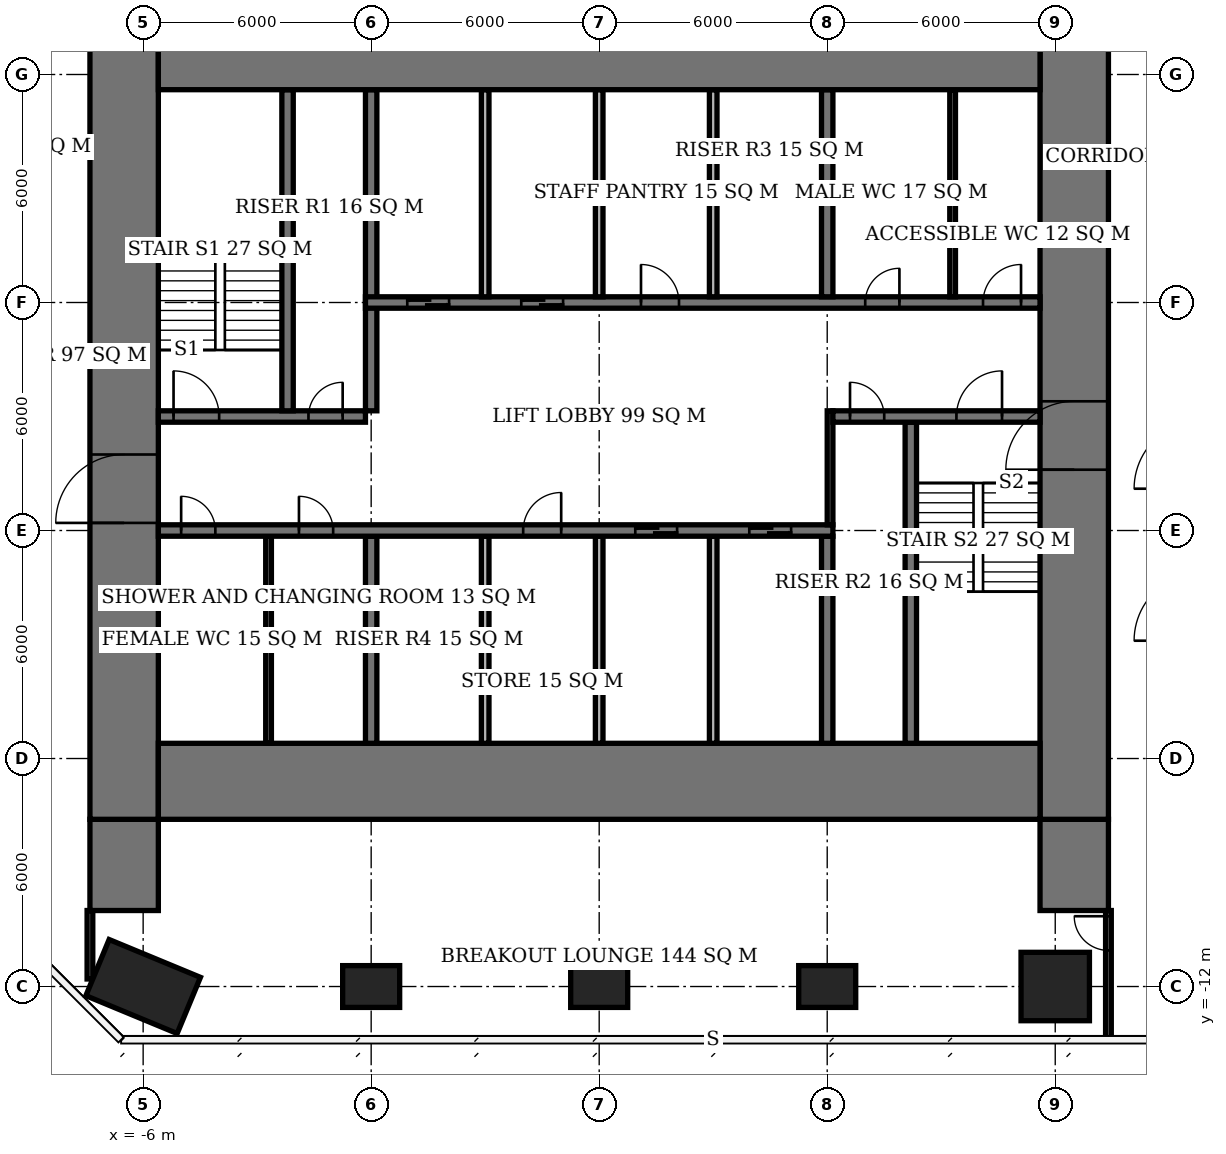
"""IFC4 building model, lengths in metres.
Left out: names, types, materials, properties, quantities, classifications, styles, units other than length and angle.
Written with IfcOpenShell. Run it as: python <this file> out.ifc"""

import sys

from ifc_helpers import new_model, si_unit, direction, frame, frame_2d, origin, origin_2d, place, context, subcontext, project, spatial, rectangle, extrude, element, fill, save


model = new_model("IFC4")
c1 = context("Model", 3, precision=1e-05, world=origin(), true_north=direction((0.0, 1.0)))
c2 = subcontext(c1, "Body", "Model", "MODEL_VIEW")
j1 = project(units=[si_unit("LENGTHUNIT", "METRE"), si_unit("PLANEANGLEUNIT", "RADIAN")], contexts=[c1])
p1 = place(None, origin())
s1 = spatial("IfcSite", under=j1, at=p1, CompositionType="ELEMENT")
p2 = place(p1, origin())
s2 = spatial("IfcBuilding", under=s1, at=p2, CompositionType="ELEMENT")
p3 = place(p2, frame((0.0, 0.0, 169.4)))
s3 = spatial("IfcBuildingStorey", under=s2, at=p3, CompositionType="ELEMENT", Elevation=169.4)
p4 = place(p3, frame((-6.0, -12.0, 0.0), z_axis=(0.0, 0.0, 1.0), x_axis=(-0.923879532511, 0.382683432365, 0.0)))
e1 = element("IfcColumn", 1, at=p4, inside=s3, PredefinedType="COLUMN", context=c2, shape_type="SweptSolid", body=[
    extrude(rectangle(XDim=2.6, YDim=1.6, at=origin_2d()), origin(), (0.0, 0.0, 1.0), 3.9),
])
for number, where, z_axis, x_axis in (
    (2, (0.0, -12.0, 0.0), (0.0, 0.0, 1.0), (1.0, 0.0, 0.0)),
    (3, (6.0, -12.0, 0.0), (0.0, 0.0, 1.0), (1.0, 0.0, 0.0)),
    (4, (12.0, -12.0, 0.0), (0.0, 0.0, 1.0), (1.0, 0.0, 0.0)),
):
    element("IfcColumn", number, at=place(p3, frame(where, z_axis=z_axis, x_axis=x_axis)), inside=s3, PredefinedType="COLUMN", context=c2, shape_type="SweptSolid", body=[
        extrude(rectangle(XDim=1.5, YDim=1.1, at=origin_2d()), origin(), (0.0, 0.0, 1.0), 3.9),
    ])
p5 = place(p3, frame((18.0, -12.0, 0.0), z_axis=(0.0, 0.0, 1.0), x_axis=(1.0, 0.0, 0.0)))
e5 = element("IfcColumn", 5, at=p5, inside=s3, PredefinedType="COLUMN", context=c2, shape_type="SweptSolid", body=[
    extrude(rectangle(XDim=1.8, YDim=1.8, at=origin_2d()), origin(), (0.0, 0.0, 1.0), 3.9),
])
for number, where, z_axis, x_axis in (
    (6, (-5.6, -6.6, 0.0), (0.0, 0.0, 1.0), (1.0, 0.0, 0.0)),
    (7, (-5.6, 12.6, 0.0), (0.0, 0.0, 1.0), (1.0, 0.0, 0.0)),
):
    element("IfcWall", number, at=place(p3, frame(where, z_axis=z_axis, x_axis=x_axis)), inside=s3, PredefinedType="SHEAR", context=c2, shape_type="SweptSolid", body=[
        extrude(rectangle(XDim=23.2, YDim=2.0, at=frame_2d((11.6, 0.0))), origin(), (0.0, 0.0, 1.0), 3.9),
    ])
p6 = place(p3, frame((-6.5, -7.6, 0.0), z_axis=(0.0, 0.0, 1.0), x_axis=(0.0, 1.0, 0.0)))
e8 = element("IfcWall", 8, at=p6, inside=s3, PredefinedType="SHEAR", context=c2, shape_type="SweptSolid", body=[
    extrude(rectangle(XDim=21.2, YDim=1.8, at=frame_2d((10.6, 0.0))), origin(), (0.0, 0.0, 1.0), 3.9),
])
p7 = place(p6, frame((7.8, 0.0, 0.0)))
e9 = element("IfcOpeningElement", 9, at=p7, cuts=e8, PredefinedType="OPENING", context=c2, shape_type="SweptSolid", body=[
    extrude(rectangle(XDim=1.8, YDim=2.4, at=frame_2d((0.9, 1.2))), frame((0.0, 0.91, 0.0), z_axis=(0.0, -1.0, 0.0), x_axis=(1.0, 0.0, 0.0)), (0.0, 0.0, 1.0), 1.82),
])
p8 = place(p3, frame((18.5, -7.6, 0.0), z_axis=(0.0, 0.0, 1.0), x_axis=(0.0, 1.0, 0.0)))
e10 = element("IfcWall", 10, at=p8, inside=s3, PredefinedType="SHEAR", context=c2, shape_type="SweptSolid", body=[
    extrude(rectangle(XDim=21.2, YDim=1.8, at=frame_2d((10.6, 0.0))), origin(), (0.0, 0.0, 1.0), 3.9),
])
p9 = place(p8, frame((9.2, 0.0, 0.0)))
e11 = element("IfcOpeningElement", 11, at=p9, cuts=e10, PredefinedType="OPENING", context=c2, shape_type="SweptSolid", body=[
    extrude(rectangle(XDim=1.8, YDim=2.4, at=frame_2d((0.9, 1.2))), frame((0.0, 0.91, 0.0), z_axis=(0.0, -1.0, 0.0), x_axis=(1.0, 0.0, 0.0)), (0.0, 0.0, 1.0), 1.82),
])
for number, where, z_axis, x_axis in (
    (12, (-6.5, -10.0, 0.0), (0.0, 0.0, 1.0), (0.0, 1.0, 0.0)),
    (13, (18.5, -10.0, 0.0), (0.0, 0.0, 1.0), (0.0, 1.0, 0.0)),
):
    element("IfcWall", number, at=place(p3, frame(where, z_axis=z_axis, x_axis=x_axis)), inside=s3, PredefinedType="SHEAR", context=c2, shape_type="SweptSolid", body=[
        extrude(rectangle(XDim=2.4, YDim=1.8, at=frame_2d((1.2, 0.0))), origin(), (0.0, 0.0, 1.0), 3.9),
    ])
p10 = place(p3, frame((-5.6, 0.0, 0.0), z_axis=(0.0, 0.0, 1.0), x_axis=(1.0, 0.0, 0.0)))
e14 = element("IfcWall", 14, at=p10, inside=s3, PredefinedType="SHEAR", context=c2, shape_type="SweptSolid", body=[
    extrude(rectangle(XDim=17.75, YDim=0.3, at=frame_2d((8.875, 0.0))), origin(), (0.0, 0.0, 1.0), 3.9),
])
p11 = place(p10, frame((0.6, 0.0, 0.0)))
e15 = element("IfcOpeningElement", 15, at=p11, cuts=e14, PredefinedType="OPENING", context=c2, shape_type="SweptSolid", body=[
    extrude(rectangle(XDim=0.9, YDim=2.1, at=frame_2d((0.45, 1.05))), frame((0.0, 0.16, 0.0), z_axis=(0.0, -1.0, 0.0), x_axis=(1.0, 0.0, 0.0)), (0.0, 0.0, 1.0), 0.32),
])
p12 = place(p10, frame((3.7, 0.0, 0.0)))
e16 = element("IfcOpeningElement", 16, at=p12, cuts=e14, PredefinedType="OPENING", context=c2, shape_type="SweptSolid", body=[
    extrude(rectangle(XDim=0.9, YDim=2.1, at=frame_2d((0.45, 1.05))), frame((0.0, 0.16, 0.0), z_axis=(0.0, -1.0, 0.0), x_axis=(1.0, 0.0, 0.0)), (0.0, 0.0, 1.0), 0.32),
])
p13 = place(p10, frame((9.6, 0.0, 0.0)))
e17 = element("IfcOpeningElement", 17, at=p13, cuts=e14, PredefinedType="OPENING", context=c2, shape_type="SweptSolid", body=[
    extrude(rectangle(XDim=1.0, YDim=2.1, at=frame_2d((0.5, 1.05))), frame((0.0, 0.16, 0.0), z_axis=(0.0, -1.0, 0.0), x_axis=(1.0, 0.0, 0.0)), (0.0, 0.0, 1.0), 0.32),
])
p14 = place(p10, frame((12.55, 0.0, 0.0)))
e18 = element("IfcOpeningElement", 18, at=p14, cuts=e14, PredefinedType="OPENING", context=c2, shape_type="SweptSolid", body=[
    extrude(rectangle(XDim=1.1, YDim=2.1, at=frame_2d((0.55, 1.05))), frame((0.0, 0.16, 0.0), z_axis=(0.0, -1.0, 0.0), x_axis=(1.0, 0.0, 0.0)), (0.0, 0.0, 1.0), 0.32),
])
p15 = place(p10, frame((15.55, 0.0, 0.0)))
e19 = element("IfcOpeningElement", 19, at=p15, cuts=e14, PredefinedType="OPENING", context=c2, shape_type="SweptSolid", body=[
    extrude(rectangle(XDim=1.1, YDim=2.1, at=frame_2d((0.55, 1.05))), frame((0.0, 0.16, 0.0), z_axis=(0.0, -1.0, 0.0), x_axis=(1.0, 0.0, 0.0)), (0.0, 0.0, 1.0), 0.32),
])
p16 = place(p3, frame((-5.6, 3.0, 0.0), z_axis=(0.0, 0.0, 1.0), x_axis=(1.0, 0.0, 0.0)))
e20 = element("IfcWall", 20, at=p16, inside=s3, PredefinedType="SHEAR", context=c2, shape_type="SweptSolid", body=[
    extrude(rectangle(XDim=5.45, YDim=0.3, at=frame_2d((2.725, 0.0))), origin(), (0.0, 0.0, 1.0), 3.9),
])
p17 = place(p16, frame((0.4, 0.0, 0.0)))
e21 = element("IfcOpeningElement", 21, at=p17, cuts=e20, PredefinedType="OPENING", context=c2, shape_type="SweptSolid", body=[
    extrude(rectangle(XDim=1.2, YDim=2.1, at=frame_2d((0.6, 1.05))), frame((0.0, 0.16, 0.0), z_axis=(0.0, -1.0, 0.0), x_axis=(1.0, 0.0, 0.0)), (0.0, 0.0, 1.0), 0.32),
])
p18 = place(p16, frame((3.95, 0.0, 0.0)))
e22 = element("IfcOpeningElement", 22, at=p18, cuts=e20, PredefinedType="OPENING", context=c2, shape_type="SweptSolid", body=[
    extrude(rectangle(XDim=0.9, YDim=2.1, at=frame_2d((0.45, 1.05))), frame((0.0, 0.16, 0.0), z_axis=(0.0, -1.0, 0.0), x_axis=(1.0, 0.0, 0.0)), (0.0, 0.0, 1.0), 0.32),
])
p19 = place(p3, frame((12.15, 3.0, 0.0), z_axis=(0.0, 0.0, 1.0), x_axis=(1.0, 0.0, 0.0)))
e23 = element("IfcWall", 23, at=p19, inside=s3, PredefinedType="SHEAR", context=c2, shape_type="SweptSolid", body=[
    extrude(rectangle(XDim=5.45, YDim=0.3, at=frame_2d((2.725, 0.0))), origin(), (0.0, 0.0, 1.0), 3.9),
])
p20 = place(p19, frame((3.25, 0.0, 0.0)))
e24 = element("IfcOpeningElement", 24, at=p20, cuts=e23, PredefinedType="OPENING", context=c2, shape_type="SweptSolid", body=[
    extrude(rectangle(XDim=1.2, YDim=2.1, at=frame_2d((0.6, 1.05))), frame((0.0, 0.16, 0.0), z_axis=(0.0, -1.0, 0.0), x_axis=(1.0, 0.0, 0.0)), (0.0, 0.0, 1.0), 0.32),
])
p21 = place(p19, frame((0.45, 0.0, 0.0)))
e25 = element("IfcOpeningElement", 25, at=p21, cuts=e23, PredefinedType="OPENING", context=c2, shape_type="SweptSolid", body=[
    extrude(rectangle(XDim=0.9, YDim=2.1, at=frame_2d((0.45, 1.05))), frame((0.0, 0.16, 0.0), z_axis=(0.0, -1.0, 0.0), x_axis=(1.0, 0.0, 0.0)), (0.0, 0.0, 1.0), 0.32),
])
p22 = place(p3, frame((-0.15, 6.0, 0.0), z_axis=(0.0, 0.0, 1.0), x_axis=(1.0, 0.0, 0.0)))
e26 = element("IfcWall", 26, at=p22, inside=s3, PredefinedType="SHEAR", context=c2, shape_type="SweptSolid", body=[
    extrude(rectangle(XDim=17.75, YDim=0.3, at=frame_2d((8.875, 0.0))), origin(), (0.0, 0.0, 1.0), 3.9),
])
p23 = place(p22, frame((13.15, 0.0, 0.0)))
e27 = element("IfcOpeningElement", 27, at=p23, cuts=e26, PredefinedType="OPENING", context=c2, shape_type="SweptSolid", body=[
    extrude(rectangle(XDim=0.9, YDim=2.1, at=frame_2d((0.45, 1.05))), frame((0.0, 0.16, 0.0), z_axis=(0.0, -1.0, 0.0), x_axis=(1.0, 0.0, 0.0)), (0.0, 0.0, 1.0), 0.32),
])
p24 = place(p22, frame((16.25, 0.0, 0.0)))
e28 = element("IfcOpeningElement", 28, at=p24, cuts=e26, PredefinedType="OPENING", context=c2, shape_type="SweptSolid", body=[
    extrude(rectangle(XDim=1.0, YDim=2.1, at=frame_2d((0.5, 1.05))), frame((0.0, 0.16, 0.0), z_axis=(0.0, -1.0, 0.0), x_axis=(1.0, 0.0, 0.0)), (0.0, 0.0, 1.0), 0.32),
])
p25 = place(p22, frame((7.25, 0.0, 0.0)))
e29 = element("IfcOpeningElement", 29, at=p25, cuts=e26, PredefinedType="OPENING", context=c2, shape_type="SweptSolid", body=[
    extrude(rectangle(XDim=1.0, YDim=2.1, at=frame_2d((0.5, 1.05))), frame((0.0, 0.16, 0.0), z_axis=(0.0, -1.0, 0.0), x_axis=(1.0, 0.0, 0.0)), (0.0, 0.0, 1.0), 0.32),
])
p26 = place(p22, frame((1.1, 0.0, 0.0)))
e30 = element("IfcOpeningElement", 30, at=p26, cuts=e26, PredefinedType="OPENING", context=c2, shape_type="SweptSolid", body=[
    extrude(rectangle(XDim=1.1, YDim=2.1, at=frame_2d((0.55, 1.05))), frame((0.0, 0.16, 0.0), z_axis=(0.0, -1.0, 0.0), x_axis=(1.0, 0.0, 0.0)), (0.0, 0.0, 1.0), 0.32),
])
p27 = place(p22, frame((4.1, 0.0, 0.0)))
e31 = element("IfcOpeningElement", 31, at=p27, cuts=e26, PredefinedType="OPENING", context=c2, shape_type="SweptSolid", body=[
    extrude(rectangle(XDim=1.1, YDim=2.1, at=frame_2d((0.55, 1.05))), frame((0.0, 0.16, 0.0), z_axis=(0.0, -1.0, 0.0), x_axis=(1.0, 0.0, 0.0)), (0.0, 0.0, 1.0), 0.32),
])
p28 = place(p3, frame((0.0, -5.6, 0.0), z_axis=(0.0, 0.0, 1.0), x_axis=(0.0, 1.0, 0.0)))
e32 = element("IfcWall", 32, at=p28, inside=s3, PredefinedType="SHEAR", context=c2, shape_type="SweptSolid", body=[
    extrude(rectangle(XDim=5.45, YDim=0.3, at=frame_2d((2.725, 0.0))), origin(), (0.0, 0.0, 1.0), 3.9),
])
p29 = place(p3, frame((0.0, 3.15, 0.0), z_axis=(0.0, 0.0, 1.0), x_axis=(0.0, 1.0, 0.0)))
e33 = element("IfcWall", 33, at=p29, inside=s3, PredefinedType="SHEAR", context=c2, shape_type="SweptSolid", body=[
    extrude(rectangle(XDim=8.45, YDim=0.3, at=frame_2d((4.225, 0.0))), origin(), (0.0, 0.0, 1.0), 3.9),
])
for number, where, z_axis, x_axis in (
    (34, (12.0, -5.6, 0.0), (0.0, 0.0, 1.0), (0.0, 1.0, 0.0)),
    (35, (12.0, 6.15, 0.0), (0.0, 0.0, 1.0), (0.0, 1.0, 0.0)),
):
    element("IfcWall", number, at=place(p3, frame(where, z_axis=z_axis, x_axis=x_axis)), inside=s3, PredefinedType="SHEAR", context=c2, shape_type="SweptSolid", body=[
        extrude(rectangle(XDim=5.45, YDim=0.3, at=frame_2d((2.725, 0.0))), origin(), (0.0, 0.0, 1.0), 3.9),
    ])
for number, where, z_axis, x_axis in (
    (36, (-2.2, 3.15, 0.0), (0.0, 0.0, 1.0), (0.0, 1.0, 0.0)),
    (37, (14.2, -5.6, 0.0), (0.0, 0.0, 1.0), (0.0, 1.0, 0.0)),
):
    element("IfcWall", number, at=place(p3, frame(where, z_axis=z_axis, x_axis=x_axis)), inside=s3, PredefinedType="SHEAR", context=c2, shape_type="SweptSolid", body=[
        extrude(rectangle(XDim=8.45, YDim=0.3, at=frame_2d((4.225, 0.0))), origin(), (0.0, 0.0, 1.0), 3.9),
    ])
for number, where, z_axis, x_axis in (
    (38, (3.0, 6.15, 0.0), (0.0, 0.0, 1.0), (0.0, 1.0, 0.0)),
    (39, (6.0, 6.15, 0.0), (0.0, 0.0, 1.0), (0.0, 1.0, 0.0)),
    (40, (9.0, 6.15, 0.0), (0.0, 0.0, 1.0), (0.0, 1.0, 0.0)),
    (41, (3.0, -5.6, 0.0), (0.0, 0.0, 1.0), (0.0, 1.0, 0.0)),
    (42, (6.0, -5.6, 0.0), (0.0, 0.0, 1.0), (0.0, 1.0, 0.0)),
    (43, (9.0, -5.6, 0.0), (0.0, 0.0, 1.0), (0.0, 1.0, 0.0)),
):
    element("IfcWall", number, at=place(p3, frame(where, z_axis=z_axis, x_axis=x_axis)), inside=s3, PredefinedType="SOLIDWALL", context=c2, shape_type="SweptSolid", body=[
        extrude(rectangle(XDim=5.45, YDim=0.2, at=frame_2d((2.725, 0.0))), origin(), (0.0, 0.0, 1.0), 3.9),
    ])
for number, where, z_axis, x_axis in (
    (44, (-2.7, -5.6, 0.0), (0.0, 0.0, 1.0), (0.0, 1.0, 0.0)),
    (45, (15.3, 6.15, 0.0), (0.0, 0.0, 1.0), (0.0, 1.0, 0.0)),
):
    element("IfcWall", number, at=place(p3, frame(where, z_axis=z_axis, x_axis=x_axis)), inside=s3, PredefinedType="PLUMBINGWALL", context=c2, shape_type="SweptSolid", body=[
        extrude(rectangle(XDim=5.45, YDim=0.15, at=frame_2d((2.725, 0.0))), origin(), (0.0, 0.0, 1.0), 3.65),
    ])
p30 = place(p3, frame((-7.4, -11.802, 0.0), z_axis=(0.0, 0.0, 1.0), x_axis=(0.0, 1.0, 0.0)))
e46 = element("IfcWall", 46, at=p30, inside=s3, PredefinedType="PARTITIONING", context=c2, shape_type="SweptSolid", body=[
    extrude(rectangle(XDim=1.802, YDim=0.15, at=frame_2d((0.901, 0.0))), origin(), (0.0, 0.0, 1.0), 3.65),
])
p31 = place(p3, frame((19.4, -13.375, 0.0), z_axis=(0.0, 0.0, 1.0), x_axis=(0.0, 1.0, 0.0)))
e47 = element("IfcWall", 47, at=p31, inside=s3, PredefinedType="PARTITIONING", context=c2, shape_type="SweptSolid", body=[
    extrude(rectangle(XDim=3.375, YDim=0.15, at=frame_2d((1.688, 0.0))), origin(), (0.0, 0.0, 1.0), 3.65),
])
p32 = place(p31, frame((2.325, 0.0, 0.0)))
e48 = element("IfcOpeningElement", 48, at=p32, cuts=e47, PredefinedType="OPENING", context=c2, shape_type="SweptSolid", body=[
    extrude(rectangle(XDim=0.9, YDim=2.1, at=frame_2d((0.45, 1.05))), frame((0.0, 0.085, 0.0), z_axis=(0.0, -1.0, 0.0), x_axis=(1.0, 0.0, 0.0)), (0.0, 0.0, 1.0), 0.17),
])
p33 = place(p3, frame((12.075, 0.15, 0.0), z_axis=(0.0, 0.0, 1.0), x_axis=(0.0, 1.0, 0.0)))
e49 = element("IfcWall", 49, at=p33, inside=s3, PredefinedType="PARTITIONING", context=c2, shape_type="SweptSolid", body=[
    extrude(rectangle(XDim=3.0, YDim=0.15, at=frame_2d((1.5, 0.0))), origin(), (0.0, 0.0, 1.0), 3.65),
])
p34 = place(p7, origin())
e50 = element("IfcDoor", 50, at=p34, inside=s3, OperationType="DOUBLE_DOOR_SINGLE_SWING", PredefinedType="DOOR", context=c2, shape_type="SweptSolid", body=[
    extrude(rectangle(XDim=1.8, YDim=2.4, at=frame_2d((0.9, 1.2))), frame((0.0, 0.025, 0.0), z_axis=(0.0, -1.0, 0.0), x_axis=(1.0, 0.0, 0.0)), (0.0, 0.0, 1.0), 0.05),
])
fill(e9, e50)
p35 = place(p9, origin())
e51 = element("IfcDoor", 51, at=p35, inside=s3, OperationType="DOUBLE_DOOR_SINGLE_SWING", PredefinedType="DOOR", context=c2, shape_type="SweptSolid", body=[
    extrude(rectangle(XDim=1.8, YDim=2.4, at=frame_2d((0.9, 1.2))), frame((0.0, 0.025, 0.0), z_axis=(0.0, -1.0, 0.0), x_axis=(1.0, 0.0, 0.0)), (0.0, 0.0, 1.0), 0.05),
])
fill(e11, e51)
p36 = place(p17, origin())
e52 = element("IfcDoor", 52, at=p36, inside=s3, OperationType="SINGLE_SWING_LEFT", PredefinedType="DOOR", context=c2, shape_type="SweptSolid", body=[
    extrude(rectangle(XDim=1.2, YDim=2.1, at=frame_2d((0.6, 1.05))), frame((0.0, 0.025, 0.0), z_axis=(0.0, -1.0, 0.0), x_axis=(1.0, 0.0, 0.0)), (0.0, 0.0, 1.0), 0.05),
])
fill(e21, e52)
p37 = place(p18, origin())
e53 = element("IfcDoor", 53, at=p37, inside=s3, OperationType="SINGLE_SWING_RIGHT", PredefinedType="DOOR", context=c2, shape_type="SweptSolid", body=[
    extrude(rectangle(XDim=0.9, YDim=2.1, at=frame_2d((0.45, 1.05))), frame((0.0, 0.025, 0.0), z_axis=(0.0, -1.0, 0.0), x_axis=(1.0, 0.0, 0.0)), (0.0, 0.0, 1.0), 0.05),
])
fill(e22, e53)
p38 = place(p20, origin())
e54 = element("IfcDoor", 54, at=p38, inside=s3, OperationType="SINGLE_SWING_RIGHT", PredefinedType="DOOR", context=c2, shape_type="SweptSolid", body=[
    extrude(rectangle(XDim=1.2, YDim=2.1, at=frame_2d((0.6, 1.05))), frame((0.0, 0.025, 0.0), z_axis=(0.0, -1.0, 0.0), x_axis=(1.0, 0.0, 0.0)), (0.0, 0.0, 1.0), 0.05),
])
fill(e24, e54)
p39 = place(p21, origin())
e55 = element("IfcDoor", 55, at=p39, inside=s3, OperationType="SINGLE_SWING_LEFT", PredefinedType="DOOR", context=c2, shape_type="SweptSolid", body=[
    extrude(rectangle(XDim=0.9, YDim=2.1, at=frame_2d((0.45, 1.05))), frame((0.0, 0.025, 0.0), z_axis=(0.0, -1.0, 0.0), x_axis=(1.0, 0.0, 0.0)), (0.0, 0.0, 1.0), 0.05),
])
fill(e25, e55)
p40 = place(p11, origin())
e56 = element("IfcDoor", 56, at=p40, inside=s3, OperationType="SINGLE_SWING_LEFT", PredefinedType="DOOR", context=c2, shape_type="SweptSolid", body=[
    extrude(rectangle(XDim=0.9, YDim=2.1, at=frame_2d((0.45, 1.05))), frame((0.0, 0.025, 0.0), z_axis=(0.0, -1.0, 0.0), x_axis=(1.0, 0.0, 0.0)), (0.0, 0.0, 1.0), 0.05),
])
fill(e15, e56)
p41 = place(p12, origin())
e57 = element("IfcDoor", 57, at=p41, inside=s3, OperationType="SINGLE_SWING_LEFT", PredefinedType="DOOR", context=c2, shape_type="SweptSolid", body=[
    extrude(rectangle(XDim=0.9, YDim=2.1, at=frame_2d((0.45, 1.05))), frame((0.0, 0.025, 0.0), z_axis=(0.0, -1.0, 0.0), x_axis=(1.0, 0.0, 0.0)), (0.0, 0.0, 1.0), 0.05),
])
fill(e16, e57)
p42 = place(p23, origin())
e58 = element("IfcDoor", 58, at=p42, inside=s3, OperationType="SINGLE_SWING_RIGHT", PredefinedType="DOOR", context=c2, shape_type="SweptSolid", body=[
    extrude(rectangle(XDim=0.9, YDim=2.1, at=frame_2d((0.45, 1.05))), frame((0.0, 0.025, 0.0), z_axis=(0.0, -1.0, 0.0), x_axis=(1.0, 0.0, 0.0)), (0.0, 0.0, 1.0), 0.05),
])
fill(e27, e58)
p43 = place(p24, origin())
e59 = element("IfcDoor", 59, at=p43, inside=s3, OperationType="SINGLE_SWING_RIGHT", PredefinedType="DOOR", context=c2, shape_type="SweptSolid", body=[
    extrude(rectangle(XDim=1.0, YDim=2.1, at=frame_2d((0.5, 1.05))), frame((0.0, 0.025, 0.0), z_axis=(0.0, -1.0, 0.0), x_axis=(1.0, 0.0, 0.0)), (0.0, 0.0, 1.0), 0.05),
])
fill(e28, e59)
p44 = place(p25, origin())
e60 = element("IfcDoor", 60, at=p44, inside=s3, OperationType="SINGLE_SWING_LEFT", PredefinedType="DOOR", context=c2, shape_type="SweptSolid", body=[
    extrude(rectangle(XDim=1.0, YDim=2.1, at=frame_2d((0.5, 1.05))), frame((0.0, 0.025, 0.0), z_axis=(0.0, -1.0, 0.0), x_axis=(1.0, 0.0, 0.0)), (0.0, 0.0, 1.0), 0.05),
])
fill(e29, e60)
p45 = place(p13, origin())
e61 = element("IfcDoor", 61, at=p45, inside=s3, OperationType="SINGLE_SWING_RIGHT", PredefinedType="DOOR", context=c2, shape_type="SweptSolid", body=[
    extrude(rectangle(XDim=1.0, YDim=2.1, at=frame_2d((0.5, 1.05))), frame((0.0, 0.025, 0.0), z_axis=(0.0, -1.0, 0.0), x_axis=(1.0, 0.0, 0.0)), (0.0, 0.0, 1.0), 0.05),
])
fill(e17, e61)
p46 = place(p26, origin())
e62 = element("IfcDoor", 62, at=p46, inside=s3, OperationType="DOUBLE_DOOR_SLIDING", PredefinedType="USERDEFINED", context=c2, shape_type="SweptSolid", body=[
    extrude(rectangle(XDim=1.1, YDim=2.1, at=frame_2d((0.55, 1.05))), frame((0.0, 0.025, 0.0), z_axis=(0.0, -1.0, 0.0), x_axis=(1.0, 0.0, 0.0)), (0.0, 0.0, 1.0), 0.05),
])
fill(e30, e62)
p47 = place(p27, origin())
e63 = element("IfcDoor", 63, at=p47, inside=s3, OperationType="DOUBLE_DOOR_SLIDING", PredefinedType="USERDEFINED", context=c2, shape_type="SweptSolid", body=[
    extrude(rectangle(XDim=1.1, YDim=2.1, at=frame_2d((0.55, 1.05))), frame((0.0, 0.025, 0.0), z_axis=(0.0, -1.0, 0.0), x_axis=(1.0, 0.0, 0.0)), (0.0, 0.0, 1.0), 0.05),
])
fill(e31, e63)
p48 = place(p14, origin())
e64 = element("IfcDoor", 64, at=p48, inside=s3, OperationType="DOUBLE_DOOR_SLIDING", PredefinedType="USERDEFINED", context=c2, shape_type="SweptSolid", body=[
    extrude(rectangle(XDim=1.1, YDim=2.1, at=frame_2d((0.55, 1.05))), frame((0.0, 0.025, 0.0), z_axis=(0.0, -1.0, 0.0), x_axis=(1.0, 0.0, 0.0)), (0.0, 0.0, 1.0), 0.05),
])
fill(e18, e64)
p49 = place(p15, origin())
e65 = element("IfcDoor", 65, at=p49, inside=s3, OperationType="DOUBLE_DOOR_SLIDING", PredefinedType="USERDEFINED", context=c2, shape_type="SweptSolid", body=[
    extrude(rectangle(XDim=1.1, YDim=2.1, at=frame_2d((0.55, 1.05))), frame((0.0, 0.025, 0.0), z_axis=(0.0, -1.0, 0.0), x_axis=(1.0, 0.0, 0.0)), (0.0, 0.0, 1.0), 0.05),
])
fill(e19, e65)
p50 = place(p32, origin())
e66 = element("IfcDoor", 66, at=p50, inside=s3, OperationType="SINGLE_SWING_RIGHT", PredefinedType="DOOR", context=c2, shape_type="SweptSolid", body=[
    extrude(rectangle(XDim=0.9, YDim=2.1, at=frame_2d((0.45, 1.05))), frame((0.0, 0.025, 0.0), z_axis=(0.0, -1.0, 0.0), x_axis=(1.0, 0.0, 0.0)), (0.0, 0.0, 1.0), 0.05),
])
fill(e48, e66)
save(model, sys.argv[1])
